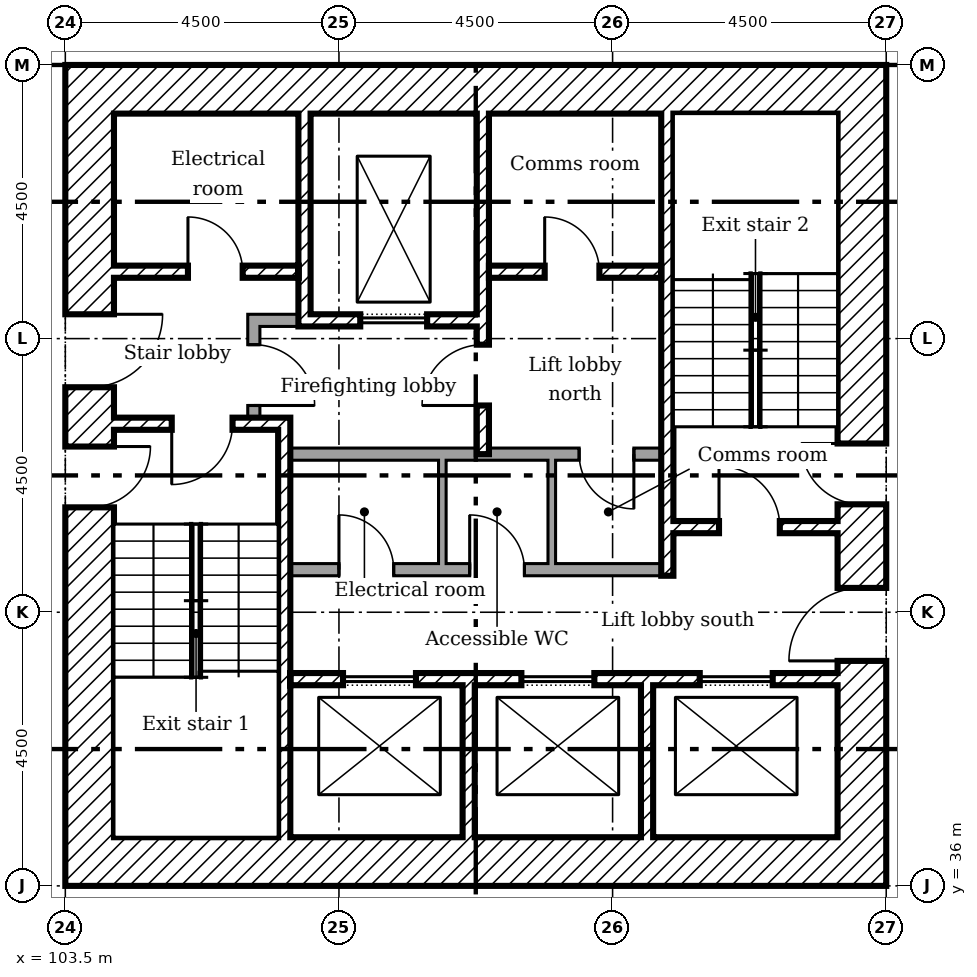
"""IFC4 building model, lengths in metres.
Left out: names, types, materials, properties, quantities, classifications, styles, units other than length and angle.
Written with IfcOpenShell. Run it as: python <this file> out.ifc"""

import sys

from ifc_helpers import new_model, si_unit, direction, frame, frame_2d, origin, place, context, subcontext, project, spatial, rectangle, extrude, element, fill, save


model = new_model("IFC4")
c1 = context("Model", 3, precision=1e-05, world=origin(), true_north=direction((0.0, 1.0)))
c2 = subcontext(c1, "Body", "Model", "MODEL_VIEW")
j1 = project(units=[si_unit("LENGTHUNIT", "METRE"), si_unit("PLANEANGLEUNIT", "RADIAN")], contexts=[c1])
p1 = place(None, origin())
s1 = spatial("IfcSite", under=j1, at=p1, CompositionType="ELEMENT")
p2 = place(p1, origin())
s2 = spatial("IfcBuilding", under=s1, at=p2, CompositionType="ELEMENT")
p3 = place(p2, frame((0.0, 0.0, 65.4)))
s3 = spatial("IfcBuildingStorey", under=s2, at=p3, CompositionType="ELEMENT", Elevation=65.4)
p4 = place(p3, frame((116.6, 36.0, 0.0), z_axis=(0.0, 0.0, 1.0), x_axis=(0.0, 1.0, 0.0)))
e1 = element("IfcWall", 1, at=p4, inside=s3, PredefinedType="SHEAR", context=c2, shape_type="SweptSolid", body=[
    extrude(rectangle(XDim=13.5, YDim=0.8, at=frame_2d((6.75, 0.0))), origin(), (0.0, 0.0, 1.0), 3.35),
])
p5 = place(p4, frame((3.7, 0.0, 0.0)))
e2 = element("IfcOpeningElement", 2, at=p5, cuts=e1, PredefinedType="OPENING", context=c2, shape_type="SweptSolid", body=[
    extrude(rectangle(XDim=1.2, YDim=2.1, at=frame_2d((0.6, 1.05))), frame((0.0, 0.41, 0.0), z_axis=(0.0, -1.0, 0.0), x_axis=(1.0, 0.0, 0.0)), (0.0, 0.0, 1.0), 0.82),
])
p6 = place(p4, frame((6.275, 0.0, 0.0)))
e3 = element("IfcOpeningElement", 3, at=p6, cuts=e1, PredefinedType="OPENING", context=c2, shape_type="SweptSolid", body=[
    extrude(rectangle(XDim=1.0, YDim=2.1, at=frame_2d((0.5, 1.05))), frame((0.0, 0.41, 0.0), z_axis=(0.0, -1.0, 0.0), x_axis=(1.0, 0.0, 0.0)), (0.0, 0.0, 1.0), 0.82),
])
for number, where in (
    (4, (104.3, 49.1, 0.0)),
    (5, (104.3, 36.4, 0.0)),
):
    element("IfcWall", number, at=place(p3, frame(where)), inside=s3, PredefinedType="SHEAR", context=c2, shape_type="SweptSolid", body=[
        extrude(rectangle(XDim=11.9, YDim=0.8, at=frame_2d((5.95, 0.0))), origin(), (0.0, 0.0, 1.0), 3.35),
    ])
p7 = place(p3, frame((103.9, 36.0, 0.0), z_axis=(0.0, 0.0, 1.0), x_axis=(0.0, 1.0, 0.0)))
e6 = element("IfcWall", 6, at=p7, inside=s3, PredefinedType="SHEAR", context=c2, shape_type="SweptSolid", body=[
    extrude(rectangle(XDim=13.5, YDim=0.8, at=frame_2d((6.75, 0.0))), origin(), (0.0, 0.0, 1.0), 3.35),
])
p8 = place(p7, frame((8.2, 0.0, 0.0)))
e7 = element("IfcOpeningElement", 7, at=p8, cuts=e6, PredefinedType="OPENING", context=c2, shape_type="SweptSolid", body=[
    extrude(rectangle(XDim=1.2, YDim=2.1, at=frame_2d((0.6, 1.05))), frame((0.0, 0.41, 0.0), z_axis=(0.0, -1.0, 0.0), x_axis=(1.0, 0.0, 0.0)), (0.0, 0.0, 1.0), 0.82),
])
p9 = place(p7, frame((6.225, 0.0, 0.0)))
e8 = element("IfcOpeningElement", 8, at=p9, cuts=e6, PredefinedType="OPENING", context=c2, shape_type="SweptSolid", body=[
    extrude(rectangle(XDim=1.0, YDim=2.1, at=frame_2d((0.5, 1.05))), frame((0.0, 0.41, 0.0), z_axis=(0.0, -1.0, 0.0), x_axis=(1.0, 0.0, 0.0)), (0.0, 0.0, 1.0), 0.82),
])
p10 = place(p3, frame((107.433, 48.7, 0.0), z_axis=(0.0, 0.0, 1.0), x_axis=(0.0, -1.0, 0.0)))
e9 = element("IfcWall", 9, at=p10, inside=s3, PredefinedType="SHEAR", context=c2, shape_type="SweptSolid", body=[
    extrude(rectangle(XDim=3.5, YDim=0.2, at=frame_2d((1.75, 0.0))), origin(), (0.0, 0.0, 1.0), 3.35),
])
p11 = place(p3, frame((110.367, 48.7, 0.0), z_axis=(0.0, 0.0, 1.0), x_axis=(0.0, -1.0, 0.0)))
e10 = element("IfcWall", 10, at=p11, inside=s3, PredefinedType="SHEAR", context=c2, shape_type="SweptSolid", body=[
    extrude(rectangle(XDim=5.6, YDim=0.2, at=frame_2d((2.8, 0.0))), origin(), (0.0, 0.0, 1.0), 3.35),
])
p12 = place(p11, frame((3.8, 0.0, 0.0)))
e11 = element("IfcOpeningElement", 11, at=p12, cuts=e10, PredefinedType="OPENING", context=c2, shape_type="SweptSolid", body=[
    extrude(rectangle(XDim=1.0, YDim=2.1, at=frame_2d((0.5, 1.05))), frame((0.0, 0.11, 0.0), z_axis=(0.0, -1.0, 0.0), x_axis=(1.0, 0.0, 0.0)), (0.0, 0.0, 1.0), 0.22),
])
for number, where, z_axis, x_axis in (
    (12, (110.133, 36.8, 0.0), (0.0, 0.0, 1.0), (0.0, 1.0, 0.0)),
    (13, (113.067, 36.8, 0.0), (0.0, 0.0, 1.0), (0.0, 1.0, 0.0)),
):
    element("IfcWall", number, at=place(p3, frame(where, z_axis=z_axis, x_axis=x_axis)), inside=s3, PredefinedType="SHEAR", context=c2, shape_type="SweptSolid", body=[
        extrude(rectangle(XDim=2.5, YDim=0.2, at=frame_2d((1.25, 0.0))), origin(), (0.0, 0.0, 1.0), 3.35),
    ])
p13 = place(p3, frame((106.5, 45.3, 0.0)))
e14 = element("IfcWall", 14, at=p13, inside=s3, PredefinedType="PARTITIONING", context=c2, shape_type="SweptSolid", body=[
    extrude(rectangle(XDim=0.833, YDim=0.2, at=frame_2d((0.417, 0.0))), origin(), (0.0, 0.0, 1.0), 3.35),
])
p14 = place(p3, frame((106.6, 43.7, 0.0), z_axis=(0.0, 0.0, 1.0), x_axis=(0.0, 1.0, 0.0)))
e15 = element("IfcWall", 15, at=p14, inside=s3, PredefinedType="PARTITIONING", context=c2, shape_type="SweptSolid", body=[
    extrude(rectangle(XDim=1.5, YDim=0.2, at=frame_2d((0.75, 0.0))), origin(), (0.0, 0.0, 1.0), 3.35),
])
p15 = place(p14, frame((0.2, 0.0, 0.0)))
e16 = element("IfcOpeningElement", 16, at=p15, cuts=e15, PredefinedType="OPENING", context=c2, shape_type="SweptSolid", body=[
    extrude(rectangle(XDim=1.0, YDim=2.1, at=frame_2d((0.5, 1.05))), frame((0.0, 0.11, 0.0), z_axis=(0.0, -1.0, 0.0), x_axis=(1.0, 0.0, 0.0)), (0.0, 0.0, 1.0), 0.22),
])
p16 = place(p3, frame((104.3, 46.1, 0.0)))
e17 = element("IfcWall", 17, at=p16, inside=s3, PredefinedType="SHEAR", context=c2, shape_type="SweptSolid", body=[
    extrude(rectangle(XDim=3.033, YDim=0.2, at=frame_2d((1.517, 0.0))), origin(), (0.0, 0.0, 1.0), 3.35),
])
p17 = place(p16, frame((1.217, 0.0, 0.0)))
e18 = element("IfcOpeningElement", 18, at=p17, cuts=e17, PredefinedType="OPENING", context=c2, shape_type="SweptSolid", body=[
    extrude(rectangle(XDim=0.9, YDim=2.1, at=frame_2d((0.45, 1.05))), frame((0.0, 0.11, 0.0), z_axis=(0.0, -1.0, 0.0), x_axis=(1.0, 0.0, 0.0)), (0.0, 0.0, 1.0), 0.22),
])
p18 = place(p3, frame((110.467, 46.1, 0.0)))
e19 = element("IfcWall", 19, at=p18, inside=s3, PredefinedType="SHEAR", context=c2, shape_type="SweptSolid", body=[
    extrude(rectangle(XDim=2.833, YDim=0.2, at=frame_2d((1.417, 0.0))), origin(), (0.0, 0.0, 1.0), 3.35),
])
p19 = place(p18, frame((0.917, 0.0, 0.0)))
e20 = element("IfcOpeningElement", 20, at=p19, cuts=e19, PredefinedType="OPENING", context=c2, shape_type="SweptSolid", body=[
    extrude(rectangle(XDim=0.9, YDim=2.1, at=frame_2d((0.45, 1.05))), frame((0.0, 0.11, 0.0), z_axis=(0.0, -1.0, 0.0), x_axis=(1.0, 0.0, 0.0)), (0.0, 0.0, 1.0), 0.22),
])
p20 = place(p3, frame((107.533, 45.3, 0.0)))
e21 = element("IfcWall", 21, at=p20, inside=s3, PredefinedType="SHEAR", context=c2, shape_type="SweptSolid", body=[
    extrude(rectangle(XDim=2.733, YDim=0.2, at=frame_2d((1.367, 0.0))), origin(), (0.0, 0.0, 1.0), 3.35),
])
p21 = place(p20, frame((0.817, 0.0, 0.0)))
e22 = element("IfcOpeningElement", 22, at=p21, cuts=e21, PredefinedType="OPENING", context=c2, shape_type="SweptSolid", body=[
    extrude(rectangle(XDim=1.1, YDim=2.1, at=frame_2d((0.55, 1.05))), frame((0.0, 0.11, 0.0), z_axis=(0.0, -1.0, 0.0), x_axis=(1.0, 0.0, 0.0)), (0.0, 0.0, 1.0), 0.22),
])
p22 = place(p3, frame((107.2, 39.4, 0.0)))
e23 = element("IfcWall", 23, at=p22, inside=s3, PredefinedType="SHEAR", context=c2, shape_type="SweptSolid", body=[
    extrude(rectangle(XDim=9.0, YDim=0.2, at=frame_2d((4.5, 0.0))), origin(), (0.0, 0.0, 1.0), 3.35),
])
p23 = place(p22, frame((0.867, 0.0, 0.0)))
e24 = element("IfcOpeningElement", 24, at=p23, cuts=e23, PredefinedType="OPENING", context=c2, shape_type="SweptSolid", body=[
    extrude(rectangle(XDim=1.2, YDim=2.1, at=frame_2d((0.6, 1.05))), frame((0.0, 0.11, 0.0), z_axis=(0.0, -1.0, 0.0), x_axis=(1.0, 0.0, 0.0)), (0.0, 0.0, 1.0), 0.22),
])
p24 = place(p22, frame((3.8, 0.0, 0.0)))
e25 = element("IfcOpeningElement", 25, at=p24, cuts=e23, PredefinedType="OPENING", context=c2, shape_type="SweptSolid", body=[
    extrude(rectangle(XDim=1.2, YDim=2.1, at=frame_2d((0.6, 1.05))), frame((0.0, 0.11, 0.0), z_axis=(0.0, -1.0, 0.0), x_axis=(1.0, 0.0, 0.0)), (0.0, 0.0, 1.0), 0.22),
])
p25 = place(p22, frame((6.733, 0.0, 0.0)))
e26 = element("IfcOpeningElement", 26, at=p25, cuts=e23, PredefinedType="OPENING", context=c2, shape_type="SweptSolid", body=[
    extrude(rectangle(XDim=1.2, YDim=2.1, at=frame_2d((0.6, 1.05))), frame((0.0, 0.11, 0.0), z_axis=(0.0, -1.0, 0.0), x_axis=(1.0, 0.0, 0.0)), (0.0, 0.0, 1.0), 0.22),
])
p26 = place(p3, frame((107.1, 36.8, 0.0), z_axis=(0.0, 0.0, 1.0), x_axis=(0.0, 1.0, 0.0)))
e27 = element("IfcWall", 27, at=p26, inside=s3, PredefinedType="SHEAR", context=c2, shape_type="SweptSolid", body=[
    extrude(rectangle(XDim=6.9, YDim=0.2, at=frame_2d((3.45, 0.0))), origin(), (0.0, 0.0, 1.0), 3.35),
])
p27 = place(p3, frame((104.3, 43.6, 0.0)))
e28 = element("IfcWall", 28, at=p27, inside=s3, PredefinedType="SHEAR", context=c2, shape_type="SweptSolid", body=[
    extrude(rectangle(XDim=2.7, YDim=0.2, at=frame_2d((1.35, 0.0))), origin(), (0.0, 0.0, 1.0), 3.35),
])
p28 = place(p27, frame((0.95, 0.0, 0.0)))
e29 = element("IfcOpeningElement", 29, at=p28, cuts=e28, PredefinedType="OPENING", context=c2, shape_type="SweptSolid", body=[
    extrude(rectangle(XDim=1.0, YDim=2.1, at=frame_2d((0.5, 1.05))), frame((0.0, 0.11, 0.0), z_axis=(0.0, -1.0, 0.0), x_axis=(1.0, 0.0, 0.0)), (0.0, 0.0, 1.0), 0.22),
])
p29 = place(p3, frame((113.5, 41.9, 0.0)))
e30 = element("IfcWall", 30, at=p29, inside=s3, PredefinedType="SHEAR", context=c2, shape_type="SweptSolid", body=[
    extrude(rectangle(XDim=2.7, YDim=0.2, at=frame_2d((1.35, 0.0))), origin(), (0.0, 0.0, 1.0), 3.35),
])
p30 = place(p29, frame((0.75, 0.0, 0.0)))
e31 = element("IfcOpeningElement", 31, at=p30, cuts=e30, PredefinedType="OPENING", context=c2, shape_type="SweptSolid", body=[
    extrude(rectangle(XDim=1.0, YDim=2.1, at=frame_2d((0.5, 1.05))), frame((0.0, 0.11, 0.0), z_axis=(0.0, -1.0, 0.0), x_axis=(1.0, 0.0, 0.0)), (0.0, 0.0, 1.0), 0.22),
])
p31 = place(p3, frame((113.4, 41.1, 0.0), z_axis=(0.0, 0.0, 1.0), x_axis=(0.0, 1.0, 0.0)))
e32 = element("IfcWall", 32, at=p31, inside=s3, PredefinedType="SHEAR", context=c2, shape_type="SweptSolid", body=[
    extrude(rectangle(XDim=7.6, YDim=0.2, at=frame_2d((3.8, 0.0))), origin(), (0.0, 0.0, 1.0), 3.35),
])
p32 = place(p3, frame((107.2, 43.1, 0.0)))
e33 = element("IfcWall", 33, at=p32, inside=s3, PredefinedType="PARTITIONING", context=c2, shape_type="SweptSolid", body=[
    extrude(rectangle(XDim=6.1, YDim=0.2, at=frame_2d((3.05, 0.0))), origin(), (0.0, 0.0, 1.0), 3.35),
])
p33 = place(p32, frame((4.75, 0.0, 0.0)))
e34 = element("IfcOpeningElement", 34, at=p33, cuts=e33, PredefinedType="OPENING", context=c2, shape_type="SweptSolid", body=[
    extrude(rectangle(XDim=0.9, YDim=2.1, at=frame_2d((0.45, 1.05))), frame((0.0, 0.11, 0.0), z_axis=(0.0, -1.0, 0.0), x_axis=(1.0, 0.0, 0.0)), (0.0, 0.0, 1.0), 0.22),
])
p34 = place(p3, frame((107.2, 41.2, 0.0)))
e35 = element("IfcWall", 35, at=p34, inside=s3, PredefinedType="PARTITIONING", context=c2, shape_type="SweptSolid", body=[
    extrude(rectangle(XDim=6.1, YDim=0.2, at=frame_2d((3.05, 0.0))), origin(), (0.0, 0.0, 1.0), 3.35),
])
p35 = place(p34, frame((0.8, 0.0, 0.0)))
e36 = element("IfcOpeningElement", 36, at=p35, cuts=e35, PredefinedType="OPENING", context=c2, shape_type="SweptSolid", body=[
    extrude(rectangle(XDim=0.9, YDim=2.1, at=frame_2d((0.45, 1.05))), frame((0.0, 0.11, 0.0), z_axis=(0.0, -1.0, 0.0), x_axis=(1.0, 0.0, 0.0)), (0.0, 0.0, 1.0), 0.22),
])
p36 = place(p34, frame((2.95, 0.0, 0.0)))
e37 = element("IfcOpeningElement", 37, at=p36, cuts=e35, PredefinedType="OPENING", context=c2, shape_type="SweptSolid", body=[
    extrude(rectangle(XDim=0.9, YDim=2.1, at=frame_2d((0.45, 1.05))), frame((0.0, 0.11, 0.0), z_axis=(0.0, -1.0, 0.0), x_axis=(1.0, 0.0, 0.0)), (0.0, 0.0, 1.0), 0.22),
])
for number, where, z_axis, x_axis in (
    (38, (109.7, 41.3, 0.0), (0.0, 0.0, 1.0), (0.0, 1.0, 0.0)),
    (39, (111.5, 41.3, 0.0), (0.0, 0.0, 1.0), (0.0, 1.0, 0.0)),
):
    element("IfcWall", number, at=place(p3, frame(where, z_axis=z_axis, x_axis=x_axis)), inside=s3, PredefinedType="PARTITIONING", context=c2, shape_type="SweptSolid", body=[
        extrude(rectangle(XDim=1.7, YDim=0.125, at=frame_2d((0.85, 0.0))), origin(), (0.0, 0.0, 1.0), 3.35),
    ])
p37 = place(p8, frame((1.2, 0.0, 0.0), x_axis=(-1.0, 0.0, 0.0)))
e40 = element("IfcDoor", 40, at=p37, inside=s3, OperationType="SINGLE_SWING_RIGHT", PredefinedType="DOOR", context=c2, shape_type="SweptSolid", body=[
    extrude(rectangle(XDim=1.2, YDim=2.1, at=frame_2d((0.6, 1.05))), frame((0.0, 0.025, 0.0), z_axis=(0.0, -1.0, 0.0), x_axis=(1.0, 0.0, 0.0)), (0.0, 0.0, 1.0), 0.05),
])
fill(e7, e40)
p38 = place(p5, origin())
e41 = element("IfcDoor", 41, at=p38, inside=s3, OperationType="SINGLE_SWING_RIGHT", PredefinedType="DOOR", context=c2, shape_type="SweptSolid", body=[
    extrude(rectangle(XDim=1.2, YDim=2.1, at=frame_2d((0.6, 1.05))), frame((0.0, 0.025, 0.0), z_axis=(0.0, -1.0, 0.0), x_axis=(1.0, 0.0, 0.0)), (0.0, 0.0, 1.0), 0.05),
])
fill(e2, e41)
p39 = place(p28, frame((1.0, 0.0, 0.0), x_axis=(-1.0, 0.0, 0.0)))
e42 = element("IfcDoor", 42, at=p39, inside=s3, OperationType="SINGLE_SWING_LEFT", PredefinedType="DOOR", context=c2, shape_type="SweptSolid", body=[
    extrude(rectangle(XDim=1.0, YDim=2.1, at=frame_2d((0.5, 1.05))), frame((0.0, 0.025, 0.0), z_axis=(0.0, -1.0, 0.0), x_axis=(1.0, 0.0, 0.0)), (0.0, 0.0, 1.0), 0.05),
])
fill(e29, e42)
p40 = place(p9, frame((1.0, 0.0, 0.0), x_axis=(-1.0, 0.0, 0.0)))
e43 = element("IfcDoor", 43, at=p40, inside=s3, OperationType="SINGLE_SWING_RIGHT", PredefinedType="DOOR", context=c2, shape_type="SweptSolid", body=[
    extrude(rectangle(XDim=1.0, YDim=2.1, at=frame_2d((0.5, 1.05))), frame((0.0, 0.025, 0.0), z_axis=(0.0, -1.0, 0.0), x_axis=(1.0, 0.0, 0.0)), (0.0, 0.0, 1.0), 0.05),
])
fill(e8, e43)
p41 = place(p30, origin())
e44 = element("IfcDoor", 44, at=p41, inside=s3, OperationType="SINGLE_SWING_RIGHT", PredefinedType="DOOR", context=c2, shape_type="SweptSolid", body=[
    extrude(rectangle(XDim=1.0, YDim=2.1, at=frame_2d((0.5, 1.05))), frame((0.0, 0.025, 0.0), z_axis=(0.0, -1.0, 0.0), x_axis=(1.0, 0.0, 0.0)), (0.0, 0.0, 1.0), 0.05),
])
fill(e31, e44)
p42 = place(p6, origin())
e45 = element("IfcDoor", 45, at=p42, inside=s3, OperationType="SINGLE_SWING_LEFT", PredefinedType="DOOR", context=c2, shape_type="SweptSolid", body=[
    extrude(rectangle(XDim=1.0, YDim=2.1, at=frame_2d((0.5, 1.05))), frame((0.0, 0.025, 0.0), z_axis=(0.0, -1.0, 0.0), x_axis=(1.0, 0.0, 0.0)), (0.0, 0.0, 1.0), 0.05),
])
fill(e3, e45)
p43 = place(p12, frame((1.0, 0.0, 0.0), x_axis=(-1.0, 0.0, 0.0)))
e46 = element("IfcDoor", 46, at=p43, inside=s3, OperationType="SINGLE_SWING_RIGHT", PredefinedType="DOOR", context=c2, shape_type="SweptSolid", body=[
    extrude(rectangle(XDim=1.0, YDim=2.1, at=frame_2d((0.5, 1.05))), frame((0.0, 0.025, 0.0), z_axis=(0.0, -1.0, 0.0), x_axis=(1.0, 0.0, 0.0)), (0.0, 0.0, 1.0), 0.05),
])
fill(e11, e46)
p44 = place(p15, frame((1.0, 0.0, 0.0), x_axis=(-1.0, 0.0, 0.0)))
e47 = element("IfcDoor", 47, at=p44, inside=s3, OperationType="SINGLE_SWING_LEFT", PredefinedType="DOOR", context=c2, shape_type="SweptSolid", body=[
    extrude(rectangle(XDim=1.0, YDim=2.1, at=frame_2d((0.5, 1.05))), frame((0.0, 0.025, 0.0), z_axis=(0.0, -1.0, 0.0), x_axis=(1.0, 0.0, 0.0)), (0.0, 0.0, 1.0), 0.05),
])
fill(e16, e47)
p45 = place(p17, origin())
e48 = element("IfcDoor", 48, at=p45, inside=s3, OperationType="SINGLE_SWING_RIGHT", PredefinedType="DOOR", context=c2, shape_type="SweptSolid", body=[
    extrude(rectangle(XDim=0.9, YDim=2.1, at=frame_2d((0.45, 1.05))), frame((0.0, 0.025, 0.0), z_axis=(0.0, -1.0, 0.0), x_axis=(1.0, 0.0, 0.0)), (0.0, 0.0, 1.0), 0.05),
])
fill(e18, e48)
p46 = place(p19, origin())
e49 = element("IfcDoor", 49, at=p46, inside=s3, OperationType="SINGLE_SWING_RIGHT", PredefinedType="DOOR", context=c2, shape_type="SweptSolid", body=[
    extrude(rectangle(XDim=0.9, YDim=2.1, at=frame_2d((0.45, 1.05))), frame((0.0, 0.025, 0.0), z_axis=(0.0, -1.0, 0.0), x_axis=(1.0, 0.0, 0.0)), (0.0, 0.0, 1.0), 0.05),
])
fill(e20, e49)
p47 = place(p35, origin())
e50 = element("IfcDoor", 50, at=p47, inside=s3, OperationType="SINGLE_SWING_RIGHT", PredefinedType="DOOR", context=c2, shape_type="SweptSolid", body=[
    extrude(rectangle(XDim=0.9, YDim=2.1, at=frame_2d((0.45, 1.05))), frame((0.0, 0.025, 0.0), z_axis=(0.0, -1.0, 0.0), x_axis=(1.0, 0.0, 0.0)), (0.0, 0.0, 1.0), 0.05),
])
fill(e36, e50)
p48 = place(p36, origin())
e51 = element("IfcDoor", 51, at=p48, inside=s3, OperationType="SINGLE_SWING_RIGHT", PredefinedType="DOOR", context=c2, shape_type="SweptSolid", body=[
    extrude(rectangle(XDim=0.9, YDim=2.1, at=frame_2d((0.45, 1.05))), frame((0.0, 0.025, 0.0), z_axis=(0.0, -1.0, 0.0), x_axis=(1.0, 0.0, 0.0)), (0.0, 0.0, 1.0), 0.05),
])
fill(e37, e51)
p49 = place(p33, frame((0.9, 0.0, 0.0), x_axis=(-1.0, 0.0, 0.0)))
e52 = element("IfcDoor", 52, at=p49, inside=s3, OperationType="SINGLE_SWING_RIGHT", PredefinedType="DOOR", context=c2, shape_type="SweptSolid", body=[
    extrude(rectangle(XDim=0.9, YDim=2.1, at=frame_2d((0.45, 1.05))), frame((0.0, 0.025, 0.0), z_axis=(0.0, -1.0, 0.0), x_axis=(1.0, 0.0, 0.0)), (0.0, 0.0, 1.0), 0.05),
])
fill(e34, e52)
p50 = place(p21, origin())
e53 = element("IfcDoor", 53, at=p50, inside=s3, OperationType="SLIDING_TO_LEFT", PredefinedType="DOOR", context=c2, shape_type="SweptSolid", body=[
    extrude(rectangle(XDim=1.1, YDim=2.1, at=frame_2d((0.55, 1.05))), frame((0.0, 0.025, 0.0), z_axis=(0.0, -1.0, 0.0), x_axis=(1.0, 0.0, 0.0)), (0.0, 0.0, 1.0), 0.05),
])
fill(e22, e53)
p51 = place(p23, origin())
e54 = element("IfcDoor", 54, at=p51, inside=s3, OperationType="SLIDING_TO_LEFT", PredefinedType="DOOR", context=c2, shape_type="SweptSolid", body=[
    extrude(rectangle(XDim=1.2, YDim=2.1, at=frame_2d((0.6, 1.05))), frame((0.0, 0.025, 0.0), z_axis=(0.0, -1.0, 0.0), x_axis=(1.0, 0.0, 0.0)), (0.0, 0.0, 1.0), 0.05),
])
fill(e24, e54)
p52 = place(p24, origin())
e55 = element("IfcDoor", 55, at=p52, inside=s3, OperationType="SLIDING_TO_LEFT", PredefinedType="DOOR", context=c2, shape_type="SweptSolid", body=[
    extrude(rectangle(XDim=1.2, YDim=2.1, at=frame_2d((0.6, 1.05))), frame((0.0, 0.025, 0.0), z_axis=(0.0, -1.0, 0.0), x_axis=(1.0, 0.0, 0.0)), (0.0, 0.0, 1.0), 0.05),
])
fill(e25, e55)
p53 = place(p25, origin())
e56 = element("IfcDoor", 56, at=p53, inside=s3, OperationType="SLIDING_TO_LEFT", PredefinedType="DOOR", context=c2, shape_type="SweptSolid", body=[
    extrude(rectangle(XDim=1.2, YDim=2.1, at=frame_2d((0.6, 1.05))), frame((0.0, 0.025, 0.0), z_axis=(0.0, -1.0, 0.0), x_axis=(1.0, 0.0, 0.0)), (0.0, 0.0, 1.0), 0.05),
])
fill(e26, e56)
save(model, sys.argv[1])
